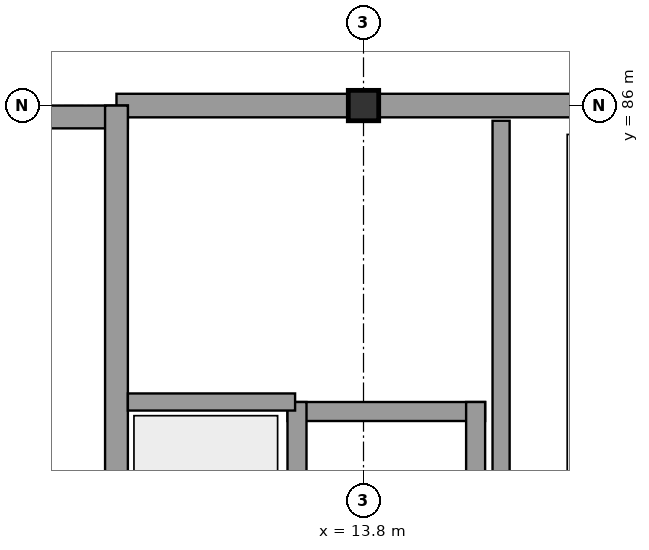
"""IFC4 building model, lengths in metres.
Left out: names, types, materials, properties, quantities, classifications, styles, units other than length and angle.
Written with IfcOpenShell. Run it as: python <this file> out.ifc"""

import sys

from ifc_helpers import new_model, si_unit, direction, frame, frame_2d, origin, origin_with_axes, origin_2d, place, context, subcontext, project, spatial, rectangle, extrude, element, fill, save


model = new_model("IFC4")
c1 = context("Model", 3, precision=1e-05, world=origin(), true_north=direction((0.0, 1.0)))
c2 = subcontext(c1, "Body", "Model", "MODEL_VIEW")
j1 = project(units=[si_unit("LENGTHUNIT", "METRE"), si_unit("PLANEANGLEUNIT", "RADIAN")], contexts=[c1])
p1 = place(None, origin())
s1 = spatial("IfcSite", under=j1, at=p1, CompositionType="ELEMENT")
p2 = place(p1, origin())
s2 = spatial("IfcBuilding", under=s1, at=p2, CompositionType="ELEMENT")
p3 = place(p2, origin())
s3 = spatial("IfcBuildingStorey", under=s2, at=p3, CompositionType="ELEMENT", Elevation=0.0)
p4 = place(p3, frame((13.8, 86.0, 0.0), z_axis=(0.0, 0.0, 1.0), x_axis=(1.0, 0.0, 0.0)))
e1 = element("IfcColumn", 1, at=p4, inside=s3, PredefinedType="COLUMN", context=c2, shape_type="SweptSolid", body=[
    extrude(rectangle(XDim=0.4, YDim=0.4, at=origin_2d()), origin(), (0.0, 0.0, 1.0), 4.4),
])
p5 = place(p3, frame((10.55, 86.0, 0.0), z_axis=(0.0, 0.0, 1.0), x_axis=(1.0, 0.0, 0.0)))
e2 = element("IfcWall", 2, at=p5, inside=s3, PredefinedType="STANDARD", context=c2, shape_type="SweptSolid", body=[
    extrude(rectangle(XDim=10.15, YDim=0.31, at=frame_2d((5.075, 0.0))), origin(), (0.0, 0.0, 1.0), 3.36),
])
p6 = place(p5, frame((6.6, 0.0, 0.9)))
e3 = element("IfcOpeningElement", 3, at=p6, cuts=e2, PredefinedType="OPENING", context=c2, shape_type="SweptSolid", body=[
    extrude(rectangle(XDim=2.0, YDim=1.8, at=frame_2d((1.0, 0.9))), frame((0.0, 0.167, 0.0), z_axis=(0.0, -1.0, 0.0), x_axis=(1.0, 0.0, 0.0)), (0.0, 0.0, 1.0), 0.334),
])
p7 = place(p3, frame((7.2, 85.85, 0.0), z_axis=(0.0, 0.0, 1.0), x_axis=(1.0, 0.0, 0.0)))
e4 = element("IfcWall", 4, at=p7, inside=s3, PredefinedType="SHEAR", context=c2, shape_type="SweptSolid", body=[
    extrude(rectangle(XDim=3.5, YDim=0.3, at=frame_2d((1.75, 0.0))), origin(), (0.0, 0.0, 1.0), 4.12),
])
p8 = place(p7, frame((1.05, 0.0, 0.0)))
e5 = element("IfcOpeningElement", 5, at=p8, cuts=e4, PredefinedType="OPENING", context=c2, shape_type="SweptSolid", body=[
    extrude(rectangle(XDim=1.4, YDim=2.25, at=frame_2d((0.7, 1.125))), frame((0.0, 0.162, 0.0), z_axis=(0.0, -1.0, 0.0), x_axis=(1.0, 0.0, 0.0)), (0.0, 0.0, 1.0), 0.324),
])
p9 = place(p3, frame((10.55, 78.5, 0.0), z_axis=(0.0, 0.0, 1.0), x_axis=(0.0, 1.0, 0.0)))
e6 = element("IfcWall", 6, at=p9, inside=s3, PredefinedType="SHEAR", context=c2, shape_type="SweptSolid", body=[
    extrude(rectangle(XDim=7.5, YDim=0.3, at=frame_2d((3.75, 0.0))), origin(), (0.0, 0.0, 1.0), 4.12),
])
p10 = place(p9, frame((5.7, 0.0, 0.0)))
e7 = element("IfcOpeningElement", 7, at=p10, cuts=e6, PredefinedType="OPENING", context=c2, shape_type="SweptSolid", body=[
    extrude(rectangle(XDim=1.15, YDim=2.15, at=frame_2d((0.575, 1.075))), frame((0.0, 0.162, 0.0), z_axis=(0.0, -1.0, 0.0), x_axis=(1.0, 0.0, 0.0)), (0.0, 0.0, 1.0), 0.324),
])
p11 = place(p3, frame((12.8, 81.975, 0.0), z_axis=(0.0, 0.0, 1.0), x_axis=(1.0, 0.0, 0.0)))
e8 = element("IfcWall", 8, at=p11, inside=s3, PredefinedType="SHEAR", context=c2, shape_type="SweptSolid", body=[
    extrude(rectangle(XDim=2.6, YDim=0.25, at=frame_2d((1.3, 0.0))), origin(), (0.0, 0.0, 1.0), 4.12),
])
p12 = place(p11, frame((0.925, 0.0, 0.0)))
e9 = element("IfcOpeningElement", 9, at=p12, cuts=e8, PredefinedType="OPENING", context=c2, shape_type="SweptSolid", body=[
    extrude(rectangle(XDim=1.0, YDim=2.1, at=frame_2d((0.5, 1.05))), frame((0.0, 0.137, 0.0), z_axis=(0.0, -1.0, 0.0), x_axis=(1.0, 0.0, 0.0)), (0.0, 0.0, 1.0), 0.274),
])
for number, where, z_axis, x_axis in (
    (10, (12.925, 78.85, 0.0), (0.0, 0.0, 1.0), (0.0, 1.0, 0.0)),
    (11, (15.275, 78.85, 0.0), (0.0, 0.0, 1.0), (0.0, 1.0, 0.0)),
):
    element("IfcWall", number, at=place(p3, frame(where, z_axis=z_axis, x_axis=x_axis)), inside=s3, PredefinedType="SHEAR", context=c2, shape_type="SweptSolid", body=[
        extrude(rectangle(XDim=3.25, YDim=0.25, at=frame_2d((1.625, 0.0))), origin(), (0.0, 0.0, 1.0), 4.12),
    ])
p13 = place(p3, frame((15.61, 78.2, 0.0), z_axis=(0.0, 0.0, 1.0), x_axis=(0.0, 1.0, 0.0)))
e12 = element("IfcWall", 12, at=p13, inside=s3, PredefinedType="PARTITIONING", context=c2, shape_type="SweptSolid", body=[
    extrude(rectangle(XDim=7.6, YDim=0.225, at=frame_2d((3.8, 0.0))), origin(), (0.0, 0.0, 1.0), 4.12),
])
p14 = place(p3, frame((10.7, 82.1, 0.0), z_axis=(0.0, 0.0, 1.0), x_axis=(1.0, 0.0, 0.0)))
e13 = element("IfcWall", 13, at=p14, inside=s3, PredefinedType="PARTITIONING", context=c2, shape_type="SweptSolid", body=[
    extrude(rectangle(XDim=2.2, YDim=0.225, at=frame_2d((1.1, 0.0))), origin(), (0.0, 0.0, 1.0), 4.12),
])
p15 = place(p14, frame((0.45, 0.0, 0.0)))
e14 = element("IfcOpeningElement", 14, at=p15, cuts=e13, PredefinedType="OPENING", context=c2, shape_type="SweptSolid", body=[
    extrude(rectangle(XDim=1.1, YDim=2.15, at=frame_2d((0.55, 1.075))), frame((0.0, 0.125, 0.0), z_axis=(0.0, -1.0, 0.0), x_axis=(1.0, 0.0, 0.0)), (0.0, 0.0, 1.0), 0.249),
])
p16 = place(p10, origin_with_axes())
e15 = element("IfcDoor", 15, at=p16, inside=s3, OperationType="SINGLE_SWING_LEFT", PredefinedType="DOOR", context=c2, shape_type="SweptSolid", body=[
    extrude(rectangle(XDim=1.15, YDim=2.15, at=frame_2d((0.575, 1.075))), frame((0.0, 0.025, 0.0), z_axis=(0.0, -1.0, 0.0), x_axis=(1.0, 0.0, 0.0)), (0.0, 0.0, 1.0), 0.05),
])
fill(e7, e15)
p17 = place(p12, origin_with_axes())
e16 = element("IfcDoor", 16, at=p17, inside=s3, OperationType="SLIDING_TO_LEFT", PredefinedType="DOOR", context=c2, shape_type="SweptSolid", body=[
    extrude(rectangle(XDim=1.0, YDim=2.1, at=frame_2d((0.5, 1.05))), frame((0.0, 0.025, 0.0), z_axis=(0.0, -1.0, 0.0), x_axis=(1.0, 0.0, 0.0)), (0.0, 0.0, 1.0), 0.05),
])
fill(e9, e16)
p18 = place(p15, origin_with_axes())
e17 = element("IfcDoor", 17, at=p18, inside=s3, OperationType="SINGLE_SWING_LEFT", PredefinedType="DOOR", context=c2, shape_type="SweptSolid", body=[
    extrude(rectangle(XDim=1.1, YDim=2.15, at=frame_2d((0.55, 1.075))), frame((0.0, 0.025, 0.0), z_axis=(0.0, -1.0, 0.0), x_axis=(1.0, 0.0, 0.0)), (0.0, 0.0, 1.0), 0.05),
])
fill(e14, e17)
save(model, sys.argv[1])
